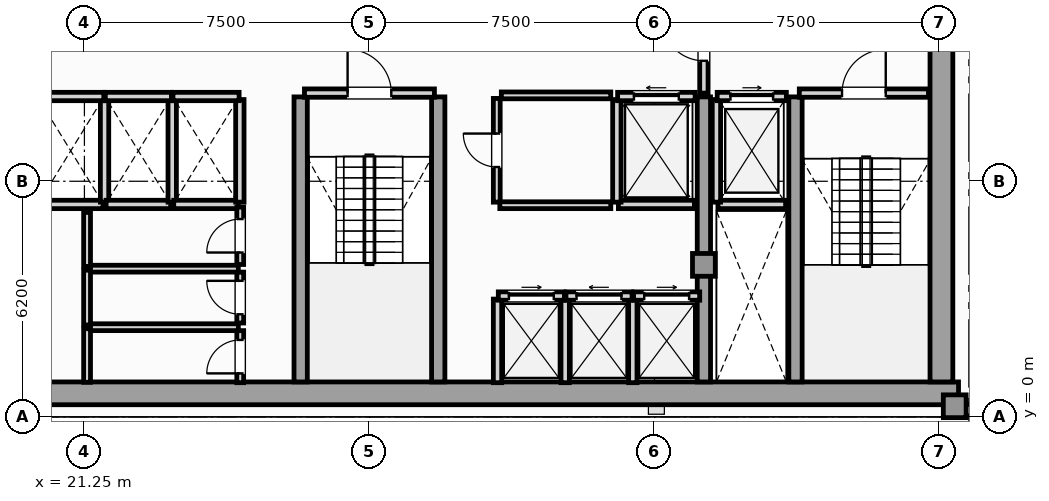
"""IFC4 building model, lengths in metres.
Left out: names, types, materials, properties, quantities, classifications, styles, units other than length and angle.
Written with IfcOpenShell. Run it as: python <this file> out.ifc"""

import sys

from ifc_helpers import new_model, si_unit, direction, frame, frame_2d, origin, origin_2d, place, context, subcontext, project, spatial, rectangle, extrude, element, fill, save


model = new_model("IFC4")
c1 = context("Model", 3, precision=1e-05, world=origin(), true_north=direction((0.0, 1.0)))
c2 = subcontext(c1, "Body", "Model", "MODEL_VIEW")
j1 = project(units=[si_unit("LENGTHUNIT", "METRE"), si_unit("PLANEANGLEUNIT", "RADIAN")], contexts=[c1])
p1 = place(None, origin())
s1 = spatial("IfcSite", under=j1, at=p1, CompositionType="ELEMENT")
p2 = place(p1, origin())
s2 = spatial("IfcBuilding", under=s1, at=p2, CompositionType="ELEMENT")
p3 = place(p2, frame((0.0, 0.0, 231.1)))
s3 = spatial("IfcBuildingStorey", under=s2, at=p3, CompositionType="ELEMENT", Elevation=231.1)
p4 = place(p3, frame((13.25, 0.62, 0.0), z_axis=(0.0, 0.0, 1.0), x_axis=(1.0, 0.0, 0.0)))
e1 = element("IfcWall", 1, at=p4, inside=s3, PredefinedType="SHEAR", context=c2, shape_type="SweptSolid", body=[
    extrude(rectangle(XDim=31.0, YDim=0.6, at=frame_2d((15.5, 0.0))), origin(), (0.0, 0.0, 1.0), 3.63),
])
p5 = place(p3, frame((43.8, 0.92, 0.0), z_axis=(0.0, 0.0, 1.0), x_axis=(0.0, 1.0, 0.0)))
e2 = element("IfcWall", 2, at=p5, inside=s3, PredefinedType="SHEAR", context=c2, shape_type="SweptSolid", body=[
    extrude(rectangle(XDim=10.53, YDim=0.6, at=frame_2d((5.265, 0.0))), origin(), (0.0, 0.0, 1.0), 3.63),
])
for number, where, z_axis, x_axis in (
    (3, (26.94, 0.92, 0.0), (0.0, 0.0, 1.0), (0.0, 1.0, 0.0)),
    (4, (30.56, 0.92, 0.0), (0.0, 0.0, 1.0), (0.0, 1.0, 0.0)),
    (5, (37.55, 0.92, 0.0), (0.0, 0.0, 1.0), (0.0, 1.0, 0.0)),
    (6, (39.96, 0.92, 0.0), (0.0, 0.0, 1.0), (0.0, 1.0, 0.0)),
):
    element("IfcWall", number, at=place(p3, frame(where, z_axis=z_axis, x_axis=x_axis)), inside=s3, PredefinedType="SHEAR", context=c2, shape_type="SweptSolid", body=[
        extrude(rectangle(XDim=7.5, YDim=0.35, at=frame_2d((3.75, 0.0))), origin(), (0.0, 0.0, 1.0), 3.63),
    ])
for number, where, z_axis, x_axis in (
    (7, (44.15, 0.28, 0.0), (0.0, 0.0, 1.0), (1.0, 0.0, 0.0)),
    (8, (37.55, 4.0, 0.0), (0.0, 0.0, 1.0), (1.0, 0.0, 0.0)),
):
    element("IfcColumn", number, at=place(p3, frame(where, z_axis=z_axis, x_axis=x_axis)), inside=s3, PredefinedType="COLUMN", context=c2, shape_type="SweptSolid", body=[
        extrude(rectangle(XDim=0.6, YDim=0.6, at=origin_2d()), origin(), (0.0, 0.0, 1.0), 3.85),
    ])
p6 = place(p3, frame((44.25, 0.18, 0.0), z_axis=(0.0, 0.0, 1.0), x_axis=(1.0, 0.0, 0.0)))
e9 = element("IfcWall", 9, at=p6, inside=s3, PredefinedType="SOLIDWALL", context=c2, shape_type="SweptSolid", body=[
    extrude(rectangle(XDim=2.51, YDim=0.3, at=frame_2d((1.255, 0.0))), origin(), (0.0, 0.0, 1.0), 3.63),
])
p7 = place(p3, frame((37.92, 5.59, 0.0), z_axis=(0.0, 0.0, 1.0), x_axis=(1.0, 0.0, 0.0)))
e10 = element("IfcWall", 10, at=p7, inside=s3, PredefinedType="SOLIDWALL", context=c2, shape_type="SweptSolid", body=[
    extrude(rectangle(XDim=1.78, YDim=0.22, at=frame_2d((0.89, 0.0))), origin(), (0.0, 0.0, 1.0), 3.63),
])
p8 = place(p3, frame((37.88, 5.65, 0.0), z_axis=(0.0, 0.0, 1.0), x_axis=(0.0, 1.0, 0.0)))
e11 = element("IfcWall", 11, at=p8, inside=s3, PredefinedType="SOLIDWALL", context=c2, shape_type="SweptSolid", body=[
    extrude(rectangle(XDim=2.7, YDim=0.22, at=frame_2d((1.35, 0.0))), origin(), (0.0, 0.0, 1.0), 3.63),
])
p9 = place(p3, frame((37.9, 8.43, 0.0), z_axis=(0.0, 0.0, 1.0), x_axis=(1.0, 0.0, 0.0)))
e12 = element("IfcWall", 12, at=p9, inside=s3, PredefinedType="SOLIDWALL", context=c2, shape_type="SweptSolid", body=[
    extrude(rectangle(XDim=1.82, YDim=0.22, at=frame_2d((0.91, 0.0))), origin(), (0.0, 0.0, 1.0), 3.63),
])
p10 = place(p9, frame((0.35, 0.0, 0.0)))
e13 = element("IfcOpeningElement", 13, at=p10, cuts=e12, PredefinedType="OPENING", context=c2, shape_type="SweptSolid", body=[
    extrude(rectangle(XDim=1.12, YDim=2.25, at=frame_2d((0.56, 1.125))), frame((0.0, 0.12, 0.0), z_axis=(0.0, -1.0, 0.0), x_axis=(1.0, 0.0, 0.0)), (0.0, 0.0, 1.0), 0.24),
])
p11 = place(p3, frame((35.3, 5.59, 0.0), z_axis=(0.0, 0.0, 1.0), x_axis=(1.0, 0.0, 0.0)))
e14 = element("IfcWall", 14, at=p11, inside=s3, PredefinedType="SOLIDWALL", context=c2, shape_type="SweptSolid", body=[
    extrude(rectangle(XDim=2.0, YDim=0.22, at=frame_2d((1.0, 0.0))), origin(), (0.0, 0.0, 1.0), 3.63),
])
p12 = place(p3, frame((35.26, 5.65, 0.0), z_axis=(0.0, 0.0, 1.0), x_axis=(0.0, 1.0, 0.0)))
e15 = element("IfcWall", 15, at=p12, inside=s3, PredefinedType="SOLIDWALL", context=c2, shape_type="SweptSolid", body=[
    extrude(rectangle(XDim=2.7, YDim=0.22, at=frame_2d((1.35, 0.0))), origin(), (0.0, 0.0, 1.0), 3.63),
])
p13 = place(p3, frame((35.28, 8.43, 0.0), z_axis=(0.0, 0.0, 1.0), x_axis=(1.0, 0.0, 0.0)))
e16 = element("IfcWall", 16, at=p13, inside=s3, PredefinedType="SOLIDWALL", context=c2, shape_type="SweptSolid", body=[
    extrude(rectangle(XDim=2.04, YDim=0.22, at=frame_2d((1.02, 0.0))), origin(), (0.0, 0.0, 1.0), 3.63),
])
p14 = place(p13, frame((0.43, 0.0, 0.0)))
e17 = element("IfcOpeningElement", 17, at=p14, cuts=e16, PredefinedType="OPENING", context=c2, shape_type="SweptSolid", body=[
    extrude(rectangle(XDim=1.18, YDim=2.2, at=frame_2d((0.59, 1.1))), frame((0.0, 0.12, 0.0), z_axis=(0.0, -1.0, 0.0), x_axis=(1.0, 0.0, 0.0)), (0.0, 0.0, 1.0), 0.24),
])
for number, where, z_axis, x_axis in (
    (18, (32.12, 0.9, 0.0), (0.0, 0.0, 1.0), (0.0, 1.0, 0.0)),
    (19, (33.9, 0.9, 0.0), (0.0, 0.0, 1.0), (0.0, 1.0, 0.0)),
):
    element("IfcWall", number, at=place(p3, frame(where, z_axis=z_axis, x_axis=x_axis)), inside=s3, PredefinedType="SOLIDWALL", context=c2, shape_type="SweptSolid", body=[
        extrude(rectangle(XDim=2.2, YDim=0.22, at=frame_2d((1.1, 0.0))), origin(), (0.0, 0.0, 1.0), 3.63),
    ])
p15 = place(p3, frame((32.14, 3.18, 0.0), z_axis=(0.0, 0.0, 1.0), x_axis=(1.0, 0.0, 0.0)))
e20 = element("IfcWall", 20, at=p15, inside=s3, PredefinedType="SOLIDWALL", context=c2, shape_type="SweptSolid", body=[
    extrude(rectangle(XDim=1.74, YDim=0.22, at=frame_2d((0.87, 0.0))), origin(), (0.0, 0.0, 1.0), 3.63),
])
p16 = place(p15, frame((0.28, 0.0, 0.0)))
e21 = element("IfcOpeningElement", 21, at=p16, cuts=e20, PredefinedType="OPENING", context=c2, shape_type="SweptSolid", body=[
    extrude(rectangle(XDim=1.18, YDim=2.2, at=frame_2d((0.59, 1.1))), frame((0.0, 0.12, 0.0), z_axis=(0.0, -1.0, 0.0), x_axis=(1.0, 0.0, 0.0)), (0.0, 0.0, 1.0), 0.24),
])
p17 = place(p3, frame((35.68, 0.9, 0.0), z_axis=(0.0, 0.0, 1.0), x_axis=(0.0, 1.0, 0.0)))
e22 = element("IfcWall", 22, at=p17, inside=s3, PredefinedType="SOLIDWALL", context=c2, shape_type="SweptSolid", body=[
    extrude(rectangle(XDim=2.2, YDim=0.22, at=frame_2d((1.1, 0.0))), origin(), (0.0, 0.0, 1.0), 3.63),
])
p18 = place(p3, frame((33.92, 3.18, 0.0), z_axis=(0.0, 0.0, 1.0), x_axis=(1.0, 0.0, 0.0)))
e23 = element("IfcWall", 23, at=p18, inside=s3, PredefinedType="SOLIDWALL", context=c2, shape_type="SweptSolid", body=[
    extrude(rectangle(XDim=1.74, YDim=0.22, at=frame_2d((0.87, 0.0))), origin(), (0.0, 0.0, 1.0), 3.63),
])
p19 = place(p18, frame((0.28, 0.0, 0.0)))
e24 = element("IfcOpeningElement", 24, at=p19, cuts=e23, PredefinedType="OPENING", context=c2, shape_type="SweptSolid", body=[
    extrude(rectangle(XDim=1.18, YDim=2.2, at=frame_2d((0.59, 1.1))), frame((0.0, 0.12, 0.0), z_axis=(0.0, -1.0, 0.0), x_axis=(1.0, 0.0, 0.0)), (0.0, 0.0, 1.0), 0.24),
])
p20 = place(p3, frame((35.7, 3.18, 0.0), z_axis=(0.0, 0.0, 1.0), x_axis=(1.0, 0.0, 0.0)))
e25 = element("IfcWall", 25, at=p20, inside=s3, PredefinedType="SOLIDWALL", context=c2, shape_type="SweptSolid", body=[
    extrude(rectangle(XDim=1.74, YDim=0.22, at=frame_2d((0.87, 0.0))), origin(), (0.0, 0.0, 1.0), 3.63),
])
p21 = place(p20, frame((0.28, 0.0, 0.0)))
e26 = element("IfcOpeningElement", 26, at=p21, cuts=e25, PredefinedType="OPENING", context=c2, shape_type="SweptSolid", body=[
    extrude(rectangle(XDim=1.18, YDim=2.2, at=frame_2d((0.59, 1.1))), frame((0.0, 0.12, 0.0), z_axis=(0.0, -1.0, 0.0), x_axis=(1.0, 0.0, 0.0)), (0.0, 0.0, 1.0), 0.24),
])
p22 = place(p3, frame((20.04, 5.59, 0.0), z_axis=(0.0, 0.0, 1.0), x_axis=(1.0, 0.0, 0.0)))
e27 = element("IfcWall", 27, at=p22, inside=s3, PredefinedType="SOLIDWALL", context=c2, shape_type="SweptSolid", body=[
    extrude(rectangle(XDim=1.7, YDim=0.22, at=frame_2d((0.85, 0.0))), origin(), (0.0, 0.0, 1.0), 3.63),
])
p23 = place(p3, frame((21.78, 5.65, 0.0), z_axis=(0.0, 0.0, 1.0), x_axis=(0.0, 1.0, 0.0)))
e28 = element("IfcWall", 28, at=p23, inside=s3, PredefinedType="SOLIDWALL", context=c2, shape_type="SweptSolid", body=[
    extrude(rectangle(XDim=2.7, YDim=0.22, at=frame_2d((1.35, 0.0))), origin(), (0.0, 0.0, 1.0), 3.63),
])
p24 = place(p3, frame((20.02, 8.43, 0.0), z_axis=(0.0, 0.0, 1.0), x_axis=(1.0, 0.0, 0.0)))
e29 = element("IfcWall", 29, at=p24, inside=s3, PredefinedType="SOLIDWALL", context=c2, shape_type="SweptSolid", body=[
    extrude(rectangle(XDim=1.74, YDim=0.22, at=frame_2d((0.87, 0.0))), origin(), (0.0, 0.0, 1.0), 3.63),
])
p25 = place(p3, frame((21.82, 5.59, 0.0), z_axis=(0.0, 0.0, 1.0), x_axis=(1.0, 0.0, 0.0)))
e30 = element("IfcWall", 30, at=p25, inside=s3, PredefinedType="SOLIDWALL", context=c2, shape_type="SweptSolid", body=[
    extrude(rectangle(XDim=1.7, YDim=0.22, at=frame_2d((0.85, 0.0))), origin(), (0.0, 0.0, 1.0), 3.63),
])
p26 = place(p3, frame((23.56, 5.65, 0.0), z_axis=(0.0, 0.0, 1.0), x_axis=(0.0, 1.0, 0.0)))
e31 = element("IfcWall", 31, at=p26, inside=s3, PredefinedType="SOLIDWALL", context=c2, shape_type="SweptSolid", body=[
    extrude(rectangle(XDim=2.7, YDim=0.22, at=frame_2d((1.35, 0.0))), origin(), (0.0, 0.0, 1.0), 3.63),
])
p27 = place(p3, frame((21.8, 8.43, 0.0), z_axis=(0.0, 0.0, 1.0), x_axis=(1.0, 0.0, 0.0)))
e32 = element("IfcWall", 32, at=p27, inside=s3, PredefinedType="SOLIDWALL", context=c2, shape_type="SweptSolid", body=[
    extrude(rectangle(XDim=1.74, YDim=0.22, at=frame_2d((0.87, 0.0))), origin(), (0.0, 0.0, 1.0), 3.63),
])
p28 = place(p3, frame((23.6, 5.59, 0.0), z_axis=(0.0, 0.0, 1.0), x_axis=(1.0, 0.0, 0.0)))
e33 = element("IfcWall", 33, at=p28, inside=s3, PredefinedType="SOLIDWALL", context=c2, shape_type="SweptSolid", body=[
    extrude(rectangle(XDim=1.7, YDim=0.22, at=frame_2d((0.85, 0.0))), origin(), (0.0, 0.0, 1.0), 3.63),
])
p29 = place(p3, frame((25.34, 5.65, 0.0), z_axis=(0.0, 0.0, 1.0), x_axis=(0.0, 1.0, 0.0)))
e34 = element("IfcWall", 34, at=p29, inside=s3, PredefinedType="SOLIDWALL", context=c2, shape_type="SweptSolid", body=[
    extrude(rectangle(XDim=2.7, YDim=0.22, at=frame_2d((1.35, 0.0))), origin(), (0.0, 0.0, 1.0), 3.63),
])
p30 = place(p3, frame((23.58, 8.43, 0.0), z_axis=(0.0, 0.0, 1.0), x_axis=(1.0, 0.0, 0.0)))
e35 = element("IfcWall", 35, at=p30, inside=s3, PredefinedType="SOLIDWALL", context=c2, shape_type="SweptSolid", body=[
    extrude(rectangle(XDim=1.74, YDim=0.22, at=frame_2d((0.87, 0.0))), origin(), (0.0, 0.0, 1.0), 3.63),
])
p31 = place(p3, frame((40.06, 8.52, 0.0), z_axis=(0.0, 0.0, 1.0), x_axis=(1.0, 0.0, 0.0)))
e36 = element("IfcWall", 36, at=p31, inside=s3, PredefinedType="SOLIDWALL", context=c2, shape_type="SweptSolid", body=[
    extrude(rectangle(XDim=3.4, YDim=0.22, at=frame_2d((1.7, 0.0))), origin(), (0.0, 0.0, 1.0), 3.63),
])
p32 = place(p31, frame((1.125, 0.0, 0.0)))
e37 = element("IfcOpeningElement", 37, at=p32, cuts=e36, PredefinedType="OPENING", context=c2, shape_type="SweptSolid", body=[
    extrude(rectangle(XDim=1.15, YDim=2.2, at=frame_2d((0.575, 1.1))), frame((0.0, 0.12, 0.0), z_axis=(0.0, -1.0, 0.0), x_axis=(1.0, 0.0, 0.0)), (0.0, 0.0, 1.0), 0.24),
])
p33 = place(p3, frame((27.04, 8.52, 0.0), z_axis=(0.0, 0.0, 1.0), x_axis=(1.0, 0.0, 0.0)))
e38 = element("IfcWall", 38, at=p33, inside=s3, PredefinedType="SOLIDWALL", context=c2, shape_type="SweptSolid", body=[
    extrude(rectangle(XDim=3.42, YDim=0.22, at=frame_2d((1.71, 0.0))), origin(), (0.0, 0.0, 1.0), 3.63),
])
p34 = place(p33, frame((1.135, 0.0, 0.0)))
e39 = element("IfcOpeningElement", 39, at=p34, cuts=e38, PredefinedType="OPENING", context=c2, shape_type="SweptSolid", body=[
    extrude(rectangle(XDim=1.15, YDim=2.2, at=frame_2d((0.575, 1.1))), frame((0.0, 0.12, 0.0), z_axis=(0.0, -1.0, 0.0), x_axis=(1.0, 0.0, 0.0)), (0.0, 0.0, 1.0), 0.24),
])
p35 = place(p3, frame((37.55, 8.52, 0.0), z_axis=(0.0, 0.0, 1.0), x_axis=(0.0, 1.0, 0.0)))
e40 = element("IfcWall", 40, at=p35, inside=s3, PredefinedType="SOLIDWALL", context=c2, shape_type="SweptSolid", body=[
    extrude(rectangle(XDim=2.8, YDim=0.22, at=frame_2d((1.4, 0.0))), origin(), (0.0, 0.0, 1.0), 3.085),
])
p36 = place(p35, frame((0.85, 0.0, 0.0)))
e41 = element("IfcOpeningElement", 41, at=p36, cuts=e40, PredefinedType="OPENING", context=c2, shape_type="SweptSolid", body=[
    extrude(rectangle(XDim=1.1, YDim=2.2, at=frame_2d((0.55, 1.1))), frame((0.0, 0.12, 0.0), z_axis=(0.0, -1.0, 0.0), x_axis=(1.0, 0.0, 0.0)), (0.0, 0.0, 1.0), 0.24),
])
p37 = place(p3, frame((25.35, 0.9, 0.0), z_axis=(0.0, 0.0, 1.0), x_axis=(0.0, 1.0, 0.0)))
e42 = element("IfcWall", 42, at=p37, inside=s3, PredefinedType="PARTITIONING", context=c2, shape_type="SweptSolid", body=[
    extrude(rectangle(XDim=1.37, YDim=0.18, at=frame_2d((0.685, 0.0))), origin(), (0.0, 0.0, 1.0), 3.63),
])
p38 = place(p37, frame((0.245, 0.0, 0.0)))
e43 = element("IfcOpeningElement", 43, at=p38, cuts=e42, PredefinedType="OPENING", context=c2, shape_type="SweptSolid", body=[
    extrude(rectangle(XDim=0.88, YDim=2.05, at=frame_2d((0.44, 1.025))), frame((0.0, 0.1, 0.0), z_axis=(0.0, -1.0, 0.0), x_axis=(1.0, 0.0, 0.0)), (0.0, 0.0, 1.0), 0.2),
])
p39 = place(p3, frame((21.36, 2.36, 0.0), z_axis=(0.0, 0.0, 1.0), x_axis=(1.0, 0.0, 0.0)))
e44 = element("IfcWall", 44, at=p39, inside=s3, PredefinedType="PARTITIONING", context=c2, shape_type="SweptSolid", body=[
    extrude(rectangle(XDim=3.94, YDim=0.18, at=frame_2d((1.97, 0.0))), origin(), (0.0, 0.0, 1.0), 3.63),
])
p40 = place(p3, frame((21.32, 0.91, 0.0), z_axis=(0.0, 0.0, 1.0), x_axis=(0.0, 1.0, 0.0)))
e45 = element("IfcWall", 45, at=p40, inside=s3, PredefinedType="PARTITIONING", context=c2, shape_type="SweptSolid", body=[
    extrude(rectangle(XDim=1.41, YDim=0.18, at=frame_2d((0.705, 0.0))), origin(), (0.0, 0.0, 1.0), 3.63),
])
p41 = place(p3, frame((25.35, 2.47, 0.0), z_axis=(0.0, 0.0, 1.0), x_axis=(0.0, 1.0, 0.0)))
e46 = element("IfcWall", 46, at=p41, inside=s3, PredefinedType="PARTITIONING", context=c2, shape_type="SweptSolid", body=[
    extrude(rectangle(XDim=1.34, YDim=0.18, at=frame_2d((0.67, 0.0))), origin(), (0.0, 0.0, 1.0), 3.63),
])
p42 = place(p41, frame((0.23, 0.0, 0.0)))
e47 = element("IfcOpeningElement", 47, at=p42, cuts=e46, PredefinedType="OPENING", context=c2, shape_type="SweptSolid", body=[
    extrude(rectangle(XDim=0.88, YDim=2.05, at=frame_2d((0.44, 1.025))), frame((0.0, 0.1, 0.0), z_axis=(0.0, -1.0, 0.0), x_axis=(1.0, 0.0, 0.0)), (0.0, 0.0, 1.0), 0.2),
])
p43 = place(p3, frame((21.36, 3.9, 0.0), z_axis=(0.0, 0.0, 1.0), x_axis=(1.0, 0.0, 0.0)))
e48 = element("IfcWall", 48, at=p43, inside=s3, PredefinedType="PARTITIONING", context=c2, shape_type="SweptSolid", body=[
    extrude(rectangle(XDim=3.94, YDim=0.18, at=frame_2d((1.97, 0.0))), origin(), (0.0, 0.0, 1.0), 3.63),
])
p44 = place(p3, frame((21.32, 2.42, 0.0), z_axis=(0.0, 0.0, 1.0), x_axis=(0.0, 1.0, 0.0)))
e49 = element("IfcWall", 49, at=p44, inside=s3, PredefinedType="PARTITIONING", context=c2, shape_type="SweptSolid", body=[
    extrude(rectangle(XDim=1.44, YDim=0.18, at=frame_2d((0.72, 0.0))), origin(), (0.0, 0.0, 1.0), 3.63),
])
p45 = place(p3, frame((25.35, 4.01, 0.0), z_axis=(0.0, 0.0, 1.0), x_axis=(0.0, 1.0, 0.0)))
e50 = element("IfcWall", 50, at=p45, inside=s3, PredefinedType="PARTITIONING", context=c2, shape_type="SweptSolid", body=[
    extrude(rectangle(XDim=1.51, YDim=0.18, at=frame_2d((0.755, 0.0))), origin(), (0.0, 0.0, 1.0), 3.63),
])
p46 = place(p45, frame((0.315, 0.0, 0.0)))
e51 = element("IfcOpeningElement", 51, at=p46, cuts=e50, PredefinedType="OPENING", context=c2, shape_type="SweptSolid", body=[
    extrude(rectangle(XDim=0.88, YDim=2.05, at=frame_2d((0.44, 1.025))), frame((0.0, 0.1, 0.0), z_axis=(0.0, -1.0, 0.0), x_axis=(1.0, 0.0, 0.0)), (0.0, 0.0, 1.0), 0.2),
])
p47 = place(p3, frame((21.32, 3.96, 0.0), z_axis=(0.0, 0.0, 1.0), x_axis=(0.0, 1.0, 0.0)))
e52 = element("IfcWall", 52, at=p47, inside=s3, PredefinedType="PARTITIONING", context=c2, shape_type="SweptSolid", body=[
    extrude(rectangle(XDim=1.42, YDim=0.18, at=frame_2d((0.71, 0.0))), origin(), (0.0, 0.0, 1.0), 3.63),
])
p48 = place(p3, frame((32.1, 5.65, 0.0), z_axis=(0.0, 0.0, 1.0), x_axis=(0.0, 1.0, 0.0)))
e53 = element("IfcWall", 53, at=p48, inside=s3, PredefinedType="PARTITIONING", context=c2, shape_type="SweptSolid", body=[
    extrude(rectangle(XDim=2.73, YDim=0.18, at=frame_2d((1.365, 0.0))), origin(), (0.0, 0.0, 1.0), 3.63),
])
p49 = place(p48, frame((0.925, 0.0, 0.0)))
e54 = element("IfcOpeningElement", 54, at=p49, cuts=e53, PredefinedType="OPENING", context=c2, shape_type="SweptSolid", body=[
    extrude(rectangle(XDim=0.88, YDim=2.05, at=frame_2d((0.44, 1.025))), frame((0.0, 0.1, 0.0), z_axis=(0.0, -1.0, 0.0), x_axis=(1.0, 0.0, 0.0)), (0.0, 0.0, 1.0), 0.2),
])
p50 = place(p3, frame((32.22, 8.46, 0.0), z_axis=(0.0, 0.0, 1.0), x_axis=(1.0, 0.0, 0.0)))
e55 = element("IfcWall", 55, at=p50, inside=s3, PredefinedType="PARTITIONING", context=c2, shape_type="SweptSolid", body=[
    extrude(rectangle(XDim=2.88, YDim=0.18, at=frame_2d((1.44, 0.0))), origin(), (0.0, 0.0, 1.0), 3.63),
])
p51 = place(p3, frame((32.18, 5.57, 0.0), z_axis=(0.0, 0.0, 1.0), x_axis=(1.0, 0.0, 0.0)))
e56 = element("IfcWall", 56, at=p51, inside=s3, PredefinedType="PARTITIONING", context=c2, shape_type="SweptSolid", body=[
    extrude(rectangle(XDim=2.92, YDim=0.18, at=frame_2d((1.46, 0.0))), origin(), (0.0, 0.0, 1.0), 3.63),
])
p52 = place(p10, origin())
e57 = element("IfcDoor", 57, at=p52, inside=s3, OperationType="SLIDING_TO_RIGHT", PredefinedType="DOOR", context=c2, shape_type="SweptSolid", body=[
    extrude(rectangle(XDim=1.12, YDim=2.25, at=frame_2d((0.56, 1.125))), frame((0.0, 0.025, 0.0), z_axis=(0.0, -1.0, 0.0), x_axis=(1.0, 0.0, 0.0)), (0.0, 0.0, 1.0), 0.05),
])
fill(e13, e57)
p53 = place(p14, origin())
e58 = element("IfcDoor", 58, at=p53, inside=s3, OperationType="SLIDING_TO_LEFT", PredefinedType="DOOR", context=c2, shape_type="SweptSolid", body=[
    extrude(rectangle(XDim=1.18, YDim=2.2, at=frame_2d((0.59, 1.1))), frame((0.0, 0.025, 0.0), z_axis=(0.0, -1.0, 0.0), x_axis=(1.0, 0.0, 0.0)), (0.0, 0.0, 1.0), 0.05),
])
fill(e17, e58)
p54 = place(p16, origin())
e59 = element("IfcDoor", 59, at=p54, inside=s3, OperationType="SLIDING_TO_RIGHT", PredefinedType="DOOR", context=c2, shape_type="SweptSolid", body=[
    extrude(rectangle(XDim=1.18, YDim=2.2, at=frame_2d((0.59, 1.1))), frame((0.0, 0.025, 0.0), z_axis=(0.0, -1.0, 0.0), x_axis=(1.0, 0.0, 0.0)), (0.0, 0.0, 1.0), 0.05),
])
fill(e21, e59)
p55 = place(p19, origin())
e60 = element("IfcDoor", 60, at=p55, inside=s3, OperationType="SLIDING_TO_LEFT", PredefinedType="DOOR", context=c2, shape_type="SweptSolid", body=[
    extrude(rectangle(XDim=1.18, YDim=2.2, at=frame_2d((0.59, 1.1))), frame((0.0, 0.025, 0.0), z_axis=(0.0, -1.0, 0.0), x_axis=(1.0, 0.0, 0.0)), (0.0, 0.0, 1.0), 0.05),
])
fill(e24, e60)
p56 = place(p21, origin())
e61 = element("IfcDoor", 61, at=p56, inside=s3, OperationType="SLIDING_TO_RIGHT", PredefinedType="DOOR", context=c2, shape_type="SweptSolid", body=[
    extrude(rectangle(XDim=1.18, YDim=2.2, at=frame_2d((0.59, 1.1))), frame((0.0, 0.025, 0.0), z_axis=(0.0, -1.0, 0.0), x_axis=(1.0, 0.0, 0.0)), (0.0, 0.0, 1.0), 0.05),
])
fill(e26, e61)
p57 = place(p32, origin())
e62 = element("IfcDoor", 62, at=p57, inside=s3, OperationType="SINGLE_SWING_RIGHT", PredefinedType="DOOR", context=c2, shape_type="SweptSolid", body=[
    extrude(rectangle(XDim=1.15, YDim=2.2, at=frame_2d((0.575, 1.1))), frame((0.0, 0.025, 0.0), z_axis=(0.0, -1.0, 0.0), x_axis=(1.0, 0.0, 0.0)), (0.0, 0.0, 1.0), 0.05),
])
fill(e37, e62)
p58 = place(p34, origin())
e63 = element("IfcDoor", 63, at=p58, inside=s3, OperationType="SINGLE_SWING_LEFT", PredefinedType="DOOR", context=c2, shape_type="SweptSolid", body=[
    extrude(rectangle(XDim=1.15, YDim=2.2, at=frame_2d((0.575, 1.1))), frame((0.0, 0.025, 0.0), z_axis=(0.0, -1.0, 0.0), x_axis=(1.0, 0.0, 0.0)), (0.0, 0.0, 1.0), 0.05),
])
fill(e39, e63)
p59 = place(p36, origin())
e64 = element("IfcDoor", 64, at=p59, inside=s3, OperationType="SINGLE_SWING_RIGHT", PredefinedType="DOOR", context=c2, shape_type="SweptSolid", body=[
    extrude(rectangle(XDim=1.1, YDim=2.2, at=frame_2d((0.55, 1.1))), frame((0.0, 0.025, 0.0), z_axis=(0.0, -1.0, 0.0), x_axis=(1.0, 0.0, 0.0)), (0.0, 0.0, 1.0), 0.05),
])
fill(e41, e64)
p60 = place(p38, origin())
e65 = element("IfcDoor", 65, at=p60, inside=s3, OperationType="SINGLE_SWING_LEFT", PredefinedType="DOOR", context=c2, shape_type="SweptSolid", body=[
    extrude(rectangle(XDim=0.88, YDim=2.05, at=frame_2d((0.44, 1.025))), frame((0.0, 0.025, 0.0), z_axis=(0.0, -1.0, 0.0), x_axis=(1.0, 0.0, 0.0)), (0.0, 0.0, 1.0), 0.05),
])
fill(e43, e65)
p61 = place(p42, origin())
e66 = element("IfcDoor", 66, at=p61, inside=s3, OperationType="SINGLE_SWING_RIGHT", PredefinedType="DOOR", context=c2, shape_type="SweptSolid", body=[
    extrude(rectangle(XDim=0.88, YDim=2.05, at=frame_2d((0.44, 1.025))), frame((0.0, 0.025, 0.0), z_axis=(0.0, -1.0, 0.0), x_axis=(1.0, 0.0, 0.0)), (0.0, 0.0, 1.0), 0.05),
])
fill(e47, e66)
p62 = place(p46, origin())
e67 = element("IfcDoor", 67, at=p62, inside=s3, OperationType="SINGLE_SWING_LEFT", PredefinedType="DOOR", context=c2, shape_type="SweptSolid", body=[
    extrude(rectangle(XDim=0.88, YDim=2.05, at=frame_2d((0.44, 1.025))), frame((0.0, 0.025, 0.0), z_axis=(0.0, -1.0, 0.0), x_axis=(1.0, 0.0, 0.0)), (0.0, 0.0, 1.0), 0.05),
])
fill(e51, e67)
p63 = place(p49, origin())
e68 = element("IfcDoor", 68, at=p63, inside=s3, OperationType="SINGLE_SWING_RIGHT", PredefinedType="DOOR", context=c2, shape_type="SweptSolid", body=[
    extrude(rectangle(XDim=0.88, YDim=2.05, at=frame_2d((0.44, 1.025))), frame((0.0, 0.025, 0.0), z_axis=(0.0, -1.0, 0.0), x_axis=(1.0, 0.0, 0.0)), (0.0, 0.0, 1.0), 0.05),
])
fill(e54, e68)
save(model, sys.argv[1])
